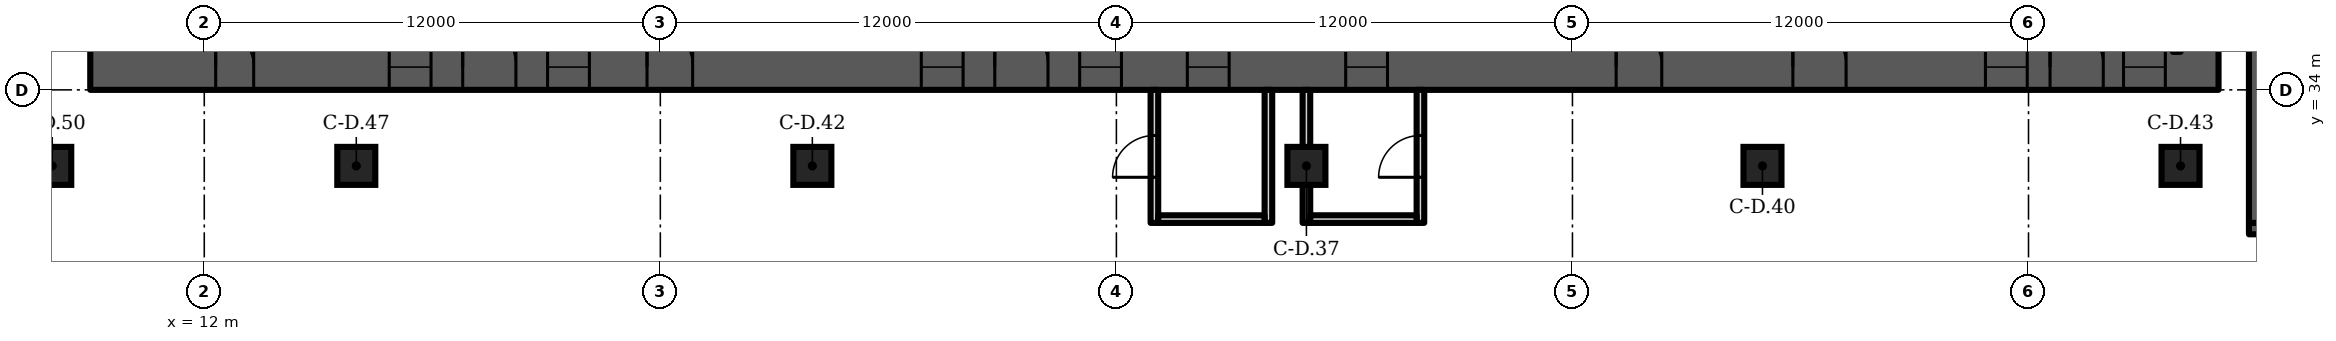
"""IFC4 building model, lengths in metres.
Left out: names, types, materials, properties, quantities, classifications, styles, units other than length and angle.
Written with IfcOpenShell. Run it as: python <this file> out.ifc"""

import sys

from ifc_helpers import new_model, si_unit, direction, frame, frame_2d, origin, origin_2d, place, context, subcontext, project, spatial, rectangle, extrude, element, fill, save


model = new_model("IFC4")
c1 = context("Model", 3, precision=1e-05, world=origin(), true_north=direction((0.0, 1.0)))
c2 = subcontext(c1, "Body", "Model", "MODEL_VIEW")
j1 = project(units=[si_unit("LENGTHUNIT", "METRE"), si_unit("PLANEANGLEUNIT", "RADIAN")], contexts=[c1])
p1 = place(None, origin())
s1 = spatial("IfcSite", under=j1, at=p1, CompositionType="ELEMENT")
p2 = place(p1, origin())
s2 = spatial("IfcBuilding", under=s1, at=p2, CompositionType="ELEMENT")
p3 = place(p2, frame((0.0, 0.0, 15.0)))
s3 = spatial("IfcBuildingStorey", under=s2, at=p3, CompositionType="ELEMENT", Elevation=15.0)
for number, where, z_axis, x_axis in (
    (1, (41.0, 32.0, 0.0), (0.0, 0.0, 1.0), (1.0, 0.0, 0.0)),
    (2, (53.0, 32.0, 0.0), (0.0, 0.0, 1.0), (1.0, 0.0, 0.0)),
    (3, (28.0, 32.0, 0.0), (0.0, 0.0, 1.0), (1.0, 0.0, 0.0)),
    (4, (64.0, 32.0, 0.0), (0.0, 0.0, 1.0), (1.0, 0.0, 0.0)),
    (5, (16.0, 32.0, 0.0), (0.0, 0.0, 1.0), (1.0, 0.0, 0.0)),
    (6, (8.0, 32.0, 0.0), (0.0, 0.0, 1.0), (1.0, 0.0, 0.0)),
):
    element("IfcColumn", number, at=place(p3, frame(where, z_axis=z_axis, x_axis=x_axis)), inside=s3, PredefinedType="COLUMN", context=c2, shape_type="SweptSolid", body=[
        extrude(rectangle(XDim=1.0, YDim=1.0, at=origin_2d()), origin(), (0.0, 0.0, 1.0), 6.5),
    ])
p4 = place(p3, frame((9.0, 34.6, 0.0), z_axis=(0.0, 0.0, 1.0), x_axis=(1.0, 0.0, 0.0)))
e7 = element("IfcWall", 7, at=p4, inside=s3, PredefinedType="SHEAR", context=c2, shape_type="SweptSolid", body=[
    extrude(rectangle(XDim=56.0, YDim=1.2, at=frame_2d((28.0, 0.0))), origin(), (0.0, 0.0, 1.0), 6.2),
])
p5 = place(p4, frame((3.3, 0.0, 0.0)))
e8 = element("IfcOpeningElement", 8, at=p5, cuts=e7, PredefinedType="OPENING", context=c2, shape_type="SweptSolid", body=[
    extrude(rectangle(XDim=1.0, YDim=2.1, at=frame_2d((0.5, 1.05))), frame((0.0, 0.61, 0.0), z_axis=(0.0, -1.0, 0.0), x_axis=(1.0, 0.0, 0.0)), (0.0, 0.0, 1.0), 1.22),
])
p6 = place(p4, frame((7.867, 0.0, 0.0)))
e9 = element("IfcOpeningElement", 9, at=p6, cuts=e7, PredefinedType="OPENING", context=c2, shape_type="SweptSolid", body=[
    extrude(rectangle(XDim=1.1, YDim=2.1, at=frame_2d((0.55, 1.05))), frame((0.0, 0.61, 0.0), z_axis=(0.0, -1.0, 0.0), x_axis=(1.0, 0.0, 0.0)), (0.0, 0.0, 1.0), 1.22),
])
p7 = place(p4, frame((12.033, 0.0, 0.0)))
e10 = element("IfcOpeningElement", 10, at=p7, cuts=e7, PredefinedType="OPENING", context=c2, shape_type="SweptSolid", body=[
    extrude(rectangle(XDim=1.1, YDim=2.1, at=frame_2d((0.55, 1.05))), frame((0.0, 0.61, 0.0), z_axis=(0.0, -1.0, 0.0), x_axis=(1.0, 0.0, 0.0)), (0.0, 0.0, 1.0), 1.22),
])
p8 = place(p4, frame((9.8, 0.0, 0.0)))
e11 = element("IfcOpeningElement", 11, at=p8, cuts=e7, PredefinedType="OPENING", context=c2, shape_type="SweptSolid", body=[
    extrude(rectangle(XDim=1.4, YDim=2.1, at=frame_2d((0.7, 1.05))), frame((0.0, 0.61, 0.0), z_axis=(0.0, -1.0, 0.0), x_axis=(1.0, 0.0, 0.0)), (0.0, 0.0, 1.0), 1.22),
])
p9 = place(p4, frame((14.65, 0.0, 0.0)))
e12 = element("IfcOpeningElement", 12, at=p9, cuts=e7, PredefinedType="OPENING", context=c2, shape_type="SweptSolid", body=[
    extrude(rectangle(XDim=1.2, YDim=2.1, at=frame_2d((0.6, 1.05))), frame((0.0, 0.61, 0.0), z_axis=(0.0, -1.0, 0.0), x_axis=(1.0, 0.0, 0.0)), (0.0, 0.0, 1.0), 1.22),
])
p10 = place(p4, frame((21.867, 0.0, 0.0)))
e13 = element("IfcOpeningElement", 13, at=p10, cuts=e7, PredefinedType="OPENING", context=c2, shape_type="SweptSolid", body=[
    extrude(rectangle(XDim=1.1, YDim=2.1, at=frame_2d((0.55, 1.05))), frame((0.0, 0.61, 0.0), z_axis=(0.0, -1.0, 0.0), x_axis=(1.0, 0.0, 0.0)), (0.0, 0.0, 1.0), 1.22),
])
p11 = place(p4, frame((26.033, 0.0, 0.0)))
e14 = element("IfcOpeningElement", 14, at=p11, cuts=e7, PredefinedType="OPENING", context=c2, shape_type="SweptSolid", body=[
    extrude(rectangle(XDim=1.1, YDim=2.1, at=frame_2d((0.55, 1.05))), frame((0.0, 0.61, 0.0), z_axis=(0.0, -1.0, 0.0), x_axis=(1.0, 0.0, 0.0)), (0.0, 0.0, 1.0), 1.22),
])
p12 = place(p4, frame((23.8, 0.0, 0.0)))
e15 = element("IfcOpeningElement", 15, at=p12, cuts=e7, PredefinedType="OPENING", context=c2, shape_type="SweptSolid", body=[
    extrude(rectangle(XDim=1.4, YDim=2.1, at=frame_2d((0.7, 1.05))), frame((0.0, 0.61, 0.0), z_axis=(0.0, -1.0, 0.0), x_axis=(1.0, 0.0, 0.0)), (0.0, 0.0, 1.0), 1.22),
])
p13 = place(p4, frame((28.867, 0.0, 0.0)))
e16 = element("IfcOpeningElement", 16, at=p13, cuts=e7, PredefinedType="OPENING", context=c2, shape_type="SweptSolid", body=[
    extrude(rectangle(XDim=1.1, YDim=2.1, at=frame_2d((0.55, 1.05))), frame((0.0, 0.61, 0.0), z_axis=(0.0, -1.0, 0.0), x_axis=(1.0, 0.0, 0.0)), (0.0, 0.0, 1.0), 1.22),
])
p14 = place(p4, frame((33.033, 0.0, 0.0)))
e17 = element("IfcOpeningElement", 17, at=p14, cuts=e7, PredefinedType="OPENING", context=c2, shape_type="SweptSolid", body=[
    extrude(rectangle(XDim=1.1, YDim=2.1, at=frame_2d((0.55, 1.05))), frame((0.0, 0.61, 0.0), z_axis=(0.0, -1.0, 0.0), x_axis=(1.0, 0.0, 0.0)), (0.0, 0.0, 1.0), 1.22),
])
p15 = place(p4, frame((40.15, 0.0, 0.0)))
e18 = element("IfcOpeningElement", 18, at=p15, cuts=e7, PredefinedType="OPENING", context=c2, shape_type="SweptSolid", body=[
    extrude(rectangle(XDim=1.2, YDim=2.1, at=frame_2d((0.6, 1.05))), frame((0.0, 0.61, 0.0), z_axis=(0.0, -1.0, 0.0), x_axis=(1.0, 0.0, 0.0)), (0.0, 0.0, 1.0), 1.22),
])
p16 = place(p4, frame((44.8, 0.0, 0.0)))
e19 = element("IfcOpeningElement", 19, at=p16, cuts=e7, PredefinedType="OPENING", context=c2, shape_type="SweptSolid", body=[
    extrude(rectangle(XDim=1.4, YDim=2.1, at=frame_2d((0.7, 1.05))), frame((0.0, 0.61, 0.0), z_axis=(0.0, -1.0, 0.0), x_axis=(1.0, 0.0, 0.0)), (0.0, 0.0, 1.0), 1.22),
])
p17 = place(p4, frame((49.867, 0.0, 0.0)))
e20 = element("IfcOpeningElement", 20, at=p17, cuts=e7, PredefinedType="OPENING", context=c2, shape_type="SweptSolid", body=[
    extrude(rectangle(XDim=1.1, YDim=2.1, at=frame_2d((0.55, 1.05))), frame((0.0, 0.61, 0.0), z_axis=(0.0, -1.0, 0.0), x_axis=(1.0, 0.0, 0.0)), (0.0, 0.0, 1.0), 1.22),
])
p18 = place(p4, frame((53.5, 0.0, 0.0)))
e21 = element("IfcOpeningElement", 21, at=p18, cuts=e7, PredefinedType="OPENING", context=c2, shape_type="SweptSolid", body=[
    extrude(rectangle(XDim=1.1, YDim=2.1, at=frame_2d((0.55, 1.05))), frame((0.0, 0.61, 0.0), z_axis=(0.0, -1.0, 0.0), x_axis=(1.0, 0.0, 0.0)), (0.0, 0.0, 1.0), 1.22),
])
p19 = place(p4, frame((51.567, 0.0, 0.0)))
e22 = element("IfcOpeningElement", 22, at=p19, cuts=e7, PredefinedType="OPENING", context=c2, shape_type="SweptSolid", body=[
    extrude(rectangle(XDim=1.4, YDim=2.1, at=frame_2d((0.7, 1.05))), frame((0.0, 0.61, 0.0), z_axis=(0.0, -1.0, 0.0), x_axis=(1.0, 0.0, 0.0)), (0.0, 0.0, 1.0), 1.22),
])
p20 = place(p3, frame((37.0, 30.5, 0.0), z_axis=(0.0, 0.0, 1.0), x_axis=(0.0, 1.0, 0.0)))
e23 = element("IfcWall", 23, at=p20, inside=s3, PredefinedType="PARTITIONING", context=c2, shape_type="SweptSolid", body=[
    extrude(rectangle(XDim=3.5, YDim=0.2, at=frame_2d((1.75, 0.0))), origin(), (0.0, 0.0, 1.0), 6.2),
])
p21 = place(p20, frame((1.2, 0.0, 0.0)))
e24 = element("IfcOpeningElement", 24, at=p21, cuts=e23, PredefinedType="OPENING", context=c2, shape_type="SweptSolid", body=[
    extrude(rectangle(XDim=1.1, YDim=2.1, at=frame_2d((0.55, 1.05))), frame((0.0, 0.11, 0.0), z_axis=(0.0, -1.0, 0.0), x_axis=(1.0, 0.0, 0.0)), (0.0, 0.0, 1.0), 0.22),
])
p22 = place(p3, frame((40.0, 30.5, 0.0), z_axis=(0.0, 0.0, 1.0), x_axis=(0.0, 1.0, 0.0)))
e25 = element("IfcWall", 25, at=p22, inside=s3, PredefinedType="PARTITIONING", context=c2, shape_type="SweptSolid", body=[
    extrude(rectangle(XDim=3.5, YDim=0.2, at=frame_2d((1.75, 0.0))), origin(), (0.0, 0.0, 1.0), 6.2),
])
p23 = place(p3, frame((37.1, 30.6, 0.0), z_axis=(0.0, 0.0, 1.0), x_axis=(1.0, 0.0, 0.0)))
e26 = element("IfcWall", 26, at=p23, inside=s3, PredefinedType="PARTITIONING", context=c2, shape_type="SweptSolid", body=[
    extrude(rectangle(XDim=2.8, YDim=0.2, at=frame_2d((1.4, 0.0))), origin(), (0.0, 0.0, 1.0), 6.2),
])
p24 = place(p3, frame((41.0, 30.5, 0.0), z_axis=(0.0, 0.0, 1.0), x_axis=(0.0, 1.0, 0.0)))
e27 = element("IfcWall", 27, at=p24, inside=s3, PredefinedType="PARTITIONING", context=c2, shape_type="SweptSolid", body=[
    extrude(rectangle(XDim=3.5, YDim=0.2, at=frame_2d((1.75, 0.0))), origin(), (0.0, 0.0, 1.0), 6.2),
])
p25 = place(p3, frame((44.0, 30.5, 0.0), z_axis=(0.0, 0.0, 1.0), x_axis=(0.0, 1.0, 0.0)))
e28 = element("IfcWall", 28, at=p25, inside=s3, PredefinedType="PARTITIONING", context=c2, shape_type="SweptSolid", body=[
    extrude(rectangle(XDim=3.5, YDim=0.2, at=frame_2d((1.75, 0.0))), origin(), (0.0, 0.0, 1.0), 6.2),
])
p26 = place(p25, frame((1.2, 0.0, 0.0)))
e29 = element("IfcOpeningElement", 29, at=p26, cuts=e28, PredefinedType="OPENING", context=c2, shape_type="SweptSolid", body=[
    extrude(rectangle(XDim=1.1, YDim=2.1, at=frame_2d((0.55, 1.05))), frame((0.0, 0.11, 0.0), z_axis=(0.0, -1.0, 0.0), x_axis=(1.0, 0.0, 0.0)), (0.0, 0.0, 1.0), 0.22),
])
p27 = place(p3, frame((41.1, 30.6, 0.0), z_axis=(0.0, 0.0, 1.0), x_axis=(1.0, 0.0, 0.0)))
e30 = element("IfcWall", 30, at=p27, inside=s3, PredefinedType="PARTITIONING", context=c2, shape_type="SweptSolid", body=[
    extrude(rectangle(XDim=2.8, YDim=0.2, at=frame_2d((1.4, 0.0))), origin(), (0.0, 0.0, 1.0), 6.2),
])
p28 = place(p3, frame((65.8, 30.35, 0.0), z_axis=(0.0, 0.0, 1.0), x_axis=(1.0, 0.0, 0.0)))
e31 = element("IfcWall", 31, at=p28, inside=s3, PredefinedType="SHEAR", context=c2, shape_type="SweptSolid", body=[
    extrude(rectangle(XDim=5.55, YDim=0.3, at=frame_2d((2.775, 0.0))), origin(), (0.0, 0.0, 1.0), 6.2),
])
p29 = place(p28, frame((1.575, 0.0, 0.0)))
e32 = element("IfcOpeningElement", 32, at=p29, cuts=e31, PredefinedType="OPENING", context=c2, shape_type="SweptSolid", body=[
    extrude(rectangle(XDim=2.4, YDim=2.1, at=frame_2d((1.2, 1.05))), frame((0.0, 0.16, 0.0), z_axis=(0.0, -1.0, 0.0), x_axis=(1.0, 0.0, 0.0)), (0.0, 0.0, 1.0), 0.32),
])
p30 = place(p3, frame((65.95, 30.5, 0.0), z_axis=(0.0, 0.0, 1.0), x_axis=(0.0, 1.0, 0.0)))
e33 = element("IfcWall", 33, at=p30, inside=s3, PredefinedType="SHEAR", context=c2, shape_type="SweptSolid", body=[
    extrude(rectangle(XDim=8.4, YDim=0.3, at=frame_2d((4.2, 0.0))), origin(), (0.0, 0.0, 1.0), 6.2),
])
p31 = place(p5, origin())
e34 = element("IfcDoor", 34, at=p31, inside=s3, OperationType="SINGLE_SWING_LEFT", PredefinedType="DOOR", context=c2, shape_type="SweptSolid", body=[
    extrude(rectangle(XDim=1.0, YDim=2.1, at=frame_2d((0.5, 1.05))), frame((0.0, 0.6, 0.0), z_axis=(0.0, -1.0, 0.0), x_axis=(1.0, 0.0, 0.0)), (0.0, 0.0, 1.0), 1.199),
])
fill(e8, e34)
p32 = place(p6, origin())
e35 = element("IfcDoor", 35, at=p32, inside=s3, OperationType="DOUBLE_DOOR_SLIDING", PredefinedType="DOOR", context=c2, shape_type="SweptSolid", body=[
    extrude(rectangle(XDim=1.1, YDim=2.1, at=frame_2d((0.55, 1.05))), frame((0.0, 0.025, 0.0), z_axis=(0.0, -1.0, 0.0), x_axis=(1.0, 0.0, 0.0)), (0.0, 0.0, 1.0), 0.05),
])
fill(e9, e35)
p33 = place(p7, origin())
e36 = element("IfcDoor", 36, at=p33, inside=s3, OperationType="DOUBLE_DOOR_SLIDING", PredefinedType="DOOR", context=c2, shape_type="SweptSolid", body=[
    extrude(rectangle(XDim=1.1, YDim=2.1, at=frame_2d((0.55, 1.05))), frame((0.0, 0.025, 0.0), z_axis=(0.0, -1.0, 0.0), x_axis=(1.0, 0.0, 0.0)), (0.0, 0.0, 1.0), 0.05),
])
fill(e10, e36)
p34 = place(p8, origin())
e37 = element("IfcDoor", 37, at=p34, inside=s3, OperationType="DOUBLE_DOOR_SINGLE_SWING", PredefinedType="DOOR", context=c2, shape_type="SweptSolid", body=[
    extrude(rectangle(XDim=1.4, YDim=2.1, at=frame_2d((0.7, 1.05))), frame((0.0, 0.025, 0.0), z_axis=(0.0, -1.0, 0.0), x_axis=(1.0, 0.0, 0.0)), (0.0, 0.0, 1.0), 0.05),
])
fill(e11, e37)
p35 = place(p9, origin())
e38 = element("IfcDoor", 38, at=p35, inside=s3, OperationType="SINGLE_SWING_LEFT", PredefinedType="DOOR", context=c2, shape_type="SweptSolid", body=[
    extrude(rectangle(XDim=1.2, YDim=2.1, at=frame_2d((0.6, 1.05))), frame((0.0, 0.025, 0.0), z_axis=(0.0, -1.0, 0.0), x_axis=(1.0, 0.0, 0.0)), (0.0, 0.0, 1.0), 0.05),
])
fill(e12, e38)
p36 = place(p10, origin())
e39 = element("IfcDoor", 39, at=p36, inside=s3, OperationType="DOUBLE_DOOR_SLIDING", PredefinedType="DOOR", context=c2, shape_type="SweptSolid", body=[
    extrude(rectangle(XDim=1.1, YDim=2.1, at=frame_2d((0.55, 1.05))), frame((0.0, 0.025, 0.0), z_axis=(0.0, -1.0, 0.0), x_axis=(1.0, 0.0, 0.0)), (0.0, 0.0, 1.0), 0.05),
])
fill(e13, e39)
p37 = place(p11, origin())
e40 = element("IfcDoor", 40, at=p37, inside=s3, OperationType="DOUBLE_DOOR_SLIDING", PredefinedType="DOOR", context=c2, shape_type="SweptSolid", body=[
    extrude(rectangle(XDim=1.1, YDim=2.1, at=frame_2d((0.55, 1.05))), frame((0.0, 0.025, 0.0), z_axis=(0.0, -1.0, 0.0), x_axis=(1.0, 0.0, 0.0)), (0.0, 0.0, 1.0), 0.05),
])
fill(e14, e40)
p38 = place(p12, origin())
e41 = element("IfcDoor", 41, at=p38, inside=s3, OperationType="DOUBLE_DOOR_SINGLE_SWING", PredefinedType="DOOR", context=c2, shape_type="SweptSolid", body=[
    extrude(rectangle(XDim=1.4, YDim=2.1, at=frame_2d((0.7, 1.05))), frame((0.0, 0.025, 0.0), z_axis=(0.0, -1.0, 0.0), x_axis=(1.0, 0.0, 0.0)), (0.0, 0.0, 1.0), 0.05),
])
fill(e15, e41)
p39 = place(p13, origin())
e42 = element("IfcDoor", 42, at=p39, inside=s3, OperationType="DOUBLE_DOOR_SLIDING", PredefinedType="DOOR", context=c2, shape_type="SweptSolid", body=[
    extrude(rectangle(XDim=1.1, YDim=2.1, at=frame_2d((0.55, 1.05))), frame((0.0, 0.025, 0.0), z_axis=(0.0, -1.0, 0.0), x_axis=(1.0, 0.0, 0.0)), (0.0, 0.0, 1.0), 0.05),
])
fill(e16, e42)
p40 = place(p14, origin())
e43 = element("IfcDoor", 43, at=p40, inside=s3, OperationType="DOUBLE_DOOR_SLIDING", PredefinedType="DOOR", context=c2, shape_type="SweptSolid", body=[
    extrude(rectangle(XDim=1.1, YDim=2.1, at=frame_2d((0.55, 1.05))), frame((0.0, 0.025, 0.0), z_axis=(0.0, -1.0, 0.0), x_axis=(1.0, 0.0, 0.0)), (0.0, 0.0, 1.0), 0.05),
])
fill(e17, e43)
p41 = place(p15, origin())
e44 = element("IfcDoor", 44, at=p41, inside=s3, OperationType="SINGLE_SWING_LEFT", PredefinedType="DOOR", context=c2, shape_type="SweptSolid", body=[
    extrude(rectangle(XDim=1.2, YDim=2.1, at=frame_2d((0.6, 1.05))), frame((0.0, 0.025, 0.0), z_axis=(0.0, -1.0, 0.0), x_axis=(1.0, 0.0, 0.0)), (0.0, 0.0, 1.0), 0.05),
])
fill(e18, e44)
p42 = place(p16, origin())
e45 = element("IfcDoor", 45, at=p42, inside=s3, OperationType="DOUBLE_DOOR_SINGLE_SWING", PredefinedType="DOOR", context=c2, shape_type="SweptSolid", body=[
    extrude(rectangle(XDim=1.4, YDim=2.1, at=frame_2d((0.7, 1.05))), frame((0.0, 0.025, 0.0), z_axis=(0.0, -1.0, 0.0), x_axis=(1.0, 0.0, 0.0)), (0.0, 0.0, 1.0), 0.05),
])
fill(e19, e45)
p43 = place(p17, origin())
e46 = element("IfcDoor", 46, at=p43, inside=s3, OperationType="DOUBLE_DOOR_SLIDING", PredefinedType="DOOR", context=c2, shape_type="SweptSolid", body=[
    extrude(rectangle(XDim=1.1, YDim=2.1, at=frame_2d((0.55, 1.05))), frame((0.0, 0.025, 0.0), z_axis=(0.0, -1.0, 0.0), x_axis=(1.0, 0.0, 0.0)), (0.0, 0.0, 1.0), 0.05),
])
fill(e20, e46)
p44 = place(p18, origin())
e47 = element("IfcDoor", 47, at=p44, inside=s3, OperationType="DOUBLE_DOOR_SLIDING", PredefinedType="DOOR", context=c2, shape_type="SweptSolid", body=[
    extrude(rectangle(XDim=1.1, YDim=2.1, at=frame_2d((0.55, 1.05))), frame((0.0, 0.025, 0.0), z_axis=(0.0, -1.0, 0.0), x_axis=(1.0, 0.0, 0.0)), (0.0, 0.0, 1.0), 0.05),
])
fill(e21, e47)
p45 = place(p19, origin())
e48 = element("IfcDoor", 48, at=p45, inside=s3, OperationType="DOUBLE_DOOR_SINGLE_SWING", PredefinedType="DOOR", context=c2, shape_type="SweptSolid", body=[
    extrude(rectangle(XDim=1.4, YDim=2.1, at=frame_2d((0.7, 1.05))), frame((0.0, 0.025, 0.0), z_axis=(0.0, -1.0, 0.0), x_axis=(1.0, 0.0, 0.0)), (0.0, 0.0, 1.0), 0.05),
])
fill(e22, e48)
p46 = place(p21, origin())
e49 = element("IfcDoor", 49, at=p46, inside=s3, OperationType="SINGLE_SWING_LEFT", PredefinedType="DOOR", context=c2, shape_type="SweptSolid", body=[
    extrude(rectangle(XDim=1.1, YDim=2.1, at=frame_2d((0.55, 1.05))), frame((0.0, 0.025, 0.0), z_axis=(0.0, -1.0, 0.0), x_axis=(1.0, 0.0, 0.0)), (0.0, 0.0, 1.0), 0.05),
])
fill(e24, e49)
p47 = place(p26, origin())
e50 = element("IfcDoor", 50, at=p47, inside=s3, OperationType="SINGLE_SWING_LEFT", PredefinedType="DOOR", context=c2, shape_type="SweptSolid", body=[
    extrude(rectangle(XDim=1.1, YDim=2.1, at=frame_2d((0.55, 1.05))), frame((0.0, 0.025, 0.0), z_axis=(0.0, -1.0, 0.0), x_axis=(1.0, 0.0, 0.0)), (0.0, 0.0, 1.0), 0.05),
])
fill(e29, e50)
save(model, sys.argv[1])
